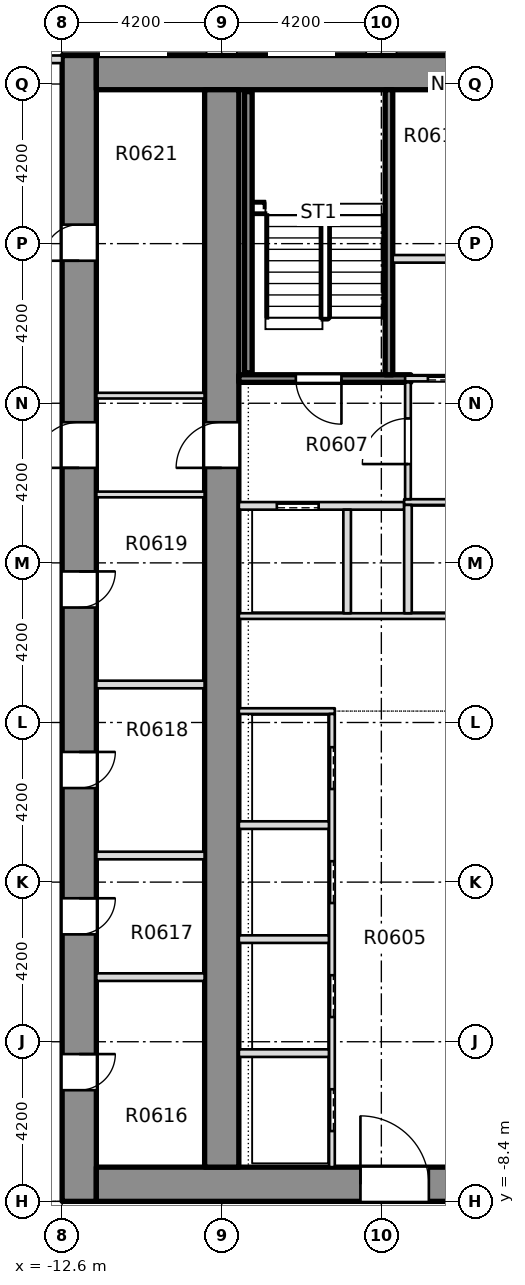
"""IFC4 building model, lengths in metres.
Left out: names, types, materials, properties, quantities, classifications, styles, units other than length and angle.
Written with IfcOpenShell. Run it as: python <this file> out.ifc"""

import sys

from ifc_helpers import new_model, si_unit, direction, frame, frame_2d, origin, place, context, subcontext, project, spatial, rectangle, extrude, element, fill, save


model = new_model("IFC4")
c1 = context("Model", 3, precision=1e-05, world=origin(), true_north=direction((0.0, 1.0)))
c2 = subcontext(c1, "Body", "Model", "MODEL_VIEW")
j1 = project(units=[si_unit("LENGTHUNIT", "METRE"), si_unit("PLANEANGLEUNIT", "RADIAN")], contexts=[c1])
p1 = place(None, origin())
s1 = spatial("IfcSite", under=j1, at=p1, CompositionType="ELEMENT")
p2 = place(p1, origin())
s2 = spatial("IfcBuilding", under=s1, at=p2, CompositionType="ELEMENT")
p3 = place(p2, frame((0.0, 0.0, 34.5)))
s3 = spatial("IfcBuildingStorey", under=s2, at=p3, CompositionType="ELEMENT", Elevation=34.5)
p4 = place(p3, frame((-12.15, -8.4, -0.32), z_axis=(0.0, 0.0, 1.0), x_axis=(0.0, 1.0, 0.0)))
e1 = element("IfcWall", 1, at=p4, inside=s3, PredefinedType="SHEAR", context=c2, shape_type="SweptSolid", body=[
    extrude(rectangle(XDim=30.15, YDim=0.9, at=frame_2d((15.075, 0.0))), origin(), (0.0, 0.0, 1.0), 3.45),
])
p5 = place(p4, frame((2.925, 0.0, 0.32)))
e2 = element("IfcOpeningElement", 2, at=p5, cuts=e1, PredefinedType="OPENING", context=c2, shape_type="SweptSolid", body=[
    extrude(rectangle(XDim=0.95, YDim=2.1, at=frame_2d((0.475, 1.05))), frame((0.0, 0.46, 0.0), z_axis=(0.0, -1.0, 0.0), x_axis=(1.0, 0.0, 0.0)), (0.0, 0.0, 1.0), 0.92),
])
p6 = place(p4, frame((7.025, 0.0, 0.32)))
e3 = element("IfcOpeningElement", 3, at=p6, cuts=e1, PredefinedType="OPENING", context=c2, shape_type="SweptSolid", body=[
    extrude(rectangle(XDim=0.95, YDim=2.1, at=frame_2d((0.475, 1.05))), frame((0.0, 0.46, 0.0), z_axis=(0.0, -1.0, 0.0), x_axis=(1.0, 0.0, 0.0)), (0.0, 0.0, 1.0), 0.92),
])
p7 = place(p4, frame((10.875, 0.0, 0.32)))
e4 = element("IfcOpeningElement", 4, at=p7, cuts=e1, PredefinedType="OPENING", context=c2, shape_type="SweptSolid", body=[
    extrude(rectangle(XDim=0.95, YDim=2.1, at=frame_2d((0.475, 1.05))), frame((0.0, 0.46, 0.0), z_axis=(0.0, -1.0, 0.0), x_axis=(1.0, 0.0, 0.0)), (0.0, 0.0, 1.0), 0.92),
])
p8 = place(p4, frame((15.625, 0.0, 0.32)))
e5 = element("IfcOpeningElement", 5, at=p8, cuts=e1, PredefinedType="OPENING", context=c2, shape_type="SweptSolid", body=[
    extrude(rectangle(XDim=0.95, YDim=2.1, at=frame_2d((0.475, 1.05))), frame((0.0, 0.46, 0.0), z_axis=(0.0, -1.0, 0.0), x_axis=(1.0, 0.0, 0.0)), (0.0, 0.0, 1.0), 0.92),
])
p9 = place(p4, frame((24.75, 0.0, 0.32)))
e6 = element("IfcOpeningElement", 6, at=p9, cuts=e1, PredefinedType="OPENING", context=c2, shape_type="SweptSolid", body=[
    extrude(rectangle(XDim=0.95, YDim=2.1, at=frame_2d((0.475, 1.05))), frame((0.0, 0.46, 0.0), z_axis=(0.0, -1.0, 0.0), x_axis=(1.0, 0.0, 0.0)), (0.0, 0.0, 1.0), 0.92),
])
p10 = place(p4, frame((19.3, 0.0, 0.32)))
e7 = element("IfcOpeningElement", 7, at=p10, cuts=e1, PredefinedType="OPENING", context=c2, shape_type="SweptSolid", body=[
    extrude(rectangle(XDim=1.2, YDim=2.1, at=frame_2d((0.6, 1.05))), frame((0.0, 0.46, 0.0), z_axis=(0.0, -1.0, 0.0), x_axis=(1.0, 0.0, 0.0)), (0.0, 0.0, 1.0), 0.92),
])
p11 = place(p3, frame((-11.7, -7.95, -0.32), z_axis=(0.0, 0.0, 1.0), x_axis=(1.0, 0.0, 0.0)))
e8 = element("IfcWall", 8, at=p11, inside=s3, PredefinedType="SHEAR", context=c2, shape_type="SweptSolid", body=[
    extrude(rectangle(XDim=23.4, YDim=0.9, at=frame_2d((11.7, 0.0))), origin(), (0.0, 0.0, 1.0), 3.45),
])
p12 = place(p11, frame((6.95, 0.0, 0.32)))
e9 = element("IfcOpeningElement", 9, at=p12, cuts=e8, PredefinedType="OPENING", context=c2, shape_type="SweptSolid", body=[
    extrude(rectangle(XDim=1.8, YDim=2.1, at=frame_2d((0.9, 1.05))), frame((0.0, 0.46, 0.0), z_axis=(0.0, -1.0, 0.0), x_axis=(1.0, 0.0, 0.0)), (0.0, 0.0, 1.0), 0.92),
])
p13 = place(p11, frame((14.65, 0.0, 0.32)))
e10 = element("IfcOpeningElement", 10, at=p13, cuts=e8, PredefinedType="OPENING", context=c2, shape_type="SweptSolid", body=[
    extrude(rectangle(XDim=1.8, YDim=2.1, at=frame_2d((0.9, 1.05))), frame((0.0, 0.46, 0.0), z_axis=(0.0, -1.0, 0.0), x_axis=(1.0, 0.0, 0.0)), (0.0, 0.0, 1.0), 0.92),
])
p14 = place(p3, frame((-11.7, 21.3, -0.32), z_axis=(0.0, 0.0, 1.0), x_axis=(1.0, 0.0, 0.0)))
e11 = element("IfcWall", 11, at=p14, inside=s3, PredefinedType="SOLIDWALL", context=c2, shape_type="SweptSolid", body=[
    extrude(rectangle(XDim=23.4, YDim=0.9, at=frame_2d((11.7, 0.0))), origin(), (0.0, 0.0, 1.0), 3.45),
])
p15 = place(p3, frame((-8.4, -7.5, -0.32), z_axis=(0.0, 0.0, 1.0), x_axis=(0.0, 1.0, 0.0)))
e12 = element("IfcWall", 12, at=p15, inside=s3, PredefinedType="SHEAR", context=c2, shape_type="SweptSolid", body=[
    extrude(rectangle(XDim=28.35, YDim=0.9, at=frame_2d((14.175, 0.0))), origin(), (0.0, 0.0, 1.0), 3.45),
])
p16 = place(p15, frame((18.4, 0.0, 0.32)))
e13 = element("IfcOpeningElement", 13, at=p16, cuts=e12, PredefinedType="OPENING", context=c2, shape_type="SweptSolid", body=[
    extrude(rectangle(XDim=1.2, YDim=2.1, at=frame_2d((0.6, 1.05))), frame((0.0, 0.46, 0.0), z_axis=(0.0, -1.0, 0.0), x_axis=(1.0, 0.0, 0.0)), (0.0, 0.0, 1.0), 0.92),
])
p17 = place(p3, frame((-12.6, 21.65, 0.0), z_axis=(0.0, 0.0, 1.0), x_axis=(-1.0, 0.0, 0.0)))
e14 = element("IfcWall", 14, at=p17, inside=s3, PredefinedType="STANDARD", context=c2, shape_type="SweptSolid", body=[
    extrude(rectangle(XDim=3.5, YDim=0.2, at=frame_2d((1.75, 0.0))), origin(), (0.0, 0.0, 1.0), 3.13),
])
p18 = place(p17, frame((0.3, 0.0, 0.2)))
e15 = element("IfcOpeningElement", 15, at=p18, cuts=e14, PredefinedType="OPENING", context=c2, shape_type="SweptSolid", body=[
    extrude(rectangle(XDim=1.8, YDim=2.65, at=frame_2d((0.9, 1.325))), frame((0.0, 0.11, 0.0), z_axis=(0.0, -1.0, 0.0), x_axis=(1.0, 0.0, 0.0)), (0.0, 0.0, 1.0), 0.22),
])
p19 = place(p17, frame((2.3, 0.0, 0.0)))
e16 = element("IfcOpeningElement", 16, at=p19, cuts=e14, PredefinedType="OPENING", context=c2, shape_type="SweptSolid", body=[
    extrude(rectangle(XDim=1.0, YDim=2.4, at=frame_2d((0.5, 1.2))), frame((0.0, 0.11, 0.0), z_axis=(0.0, -1.0, 0.0), x_axis=(1.0, 0.0, 0.0)), (0.0, 0.0, 1.0), 0.22),
])
for number, where, z_axis, x_axis in (
    (17, (-7.949, -4.5, 0.0), (0.0, 0.0, 1.0), (1.0, 0.0, 0.0)),
    (18, (-7.949, -1.5, 0.0), (0.0, 0.0, 1.0), (1.0, 0.0, 0.0)),
    (19, (-7.949, 1.5, 0.0), (0.0, 0.0, 1.0), (1.0, 0.0, 0.0)),
):
    element("IfcWall", number, at=place(p3, frame(where, z_axis=z_axis, x_axis=x_axis)), inside=s3, PredefinedType="PARTITIONING", context=c2, shape_type="SweptSolid", body=[
        extrude(rectangle(XDim=2.374, YDim=0.2, at=frame_2d((1.187, 0.0))), origin(), (0.0, 0.0, 1.0), 3.13),
    ])
p20 = place(p3, frame((-7.949, 4.5, 0.0), z_axis=(0.0, 0.0, 1.0), x_axis=(1.0, 0.0, 0.0)))
e20 = element("IfcWall", 20, at=p20, inside=s3, PredefinedType="PARTITIONING", context=c2, shape_type="SweptSolid", body=[
    extrude(rectangle(XDim=2.524, YDim=0.15, at=frame_2d((1.262, 0.0))), origin(), (0.0, 0.0, 1.0), 3.13),
])
p21 = place(p3, frame((-7.949, 7.0, 0.0), z_axis=(0.0, 0.0, 1.0), x_axis=(1.0, 0.0, 0.0)))
e21 = element("IfcWall", 21, at=p21, inside=s3, PredefinedType="PARTITIONING", context=c2, shape_type="SweptSolid", body=[
    extrude(rectangle(XDim=15.898, YDim=0.15, at=frame_2d((7.949, 0.0))), origin(), (0.0, 0.0, 1.0), 3.13),
])
p22 = place(p21, frame((7.249, 0.0, 0.0)))
e22 = element("IfcOpeningElement", 22, at=p22, cuts=e21, PredefinedType="OPENING", context=c2, shape_type="SweptSolid", body=[
    extrude(rectangle(XDim=1.4, YDim=2.1, at=frame_2d((0.7, 1.05))), frame((0.0, 0.085, 0.0), z_axis=(0.0, -1.0, 0.0), x_axis=(1.0, 0.0, 0.0)), (0.0, 0.0, 1.0), 0.17),
])
p23 = place(p3, frame((-7.949, 9.9, 0.0), z_axis=(0.0, 0.0, 1.0), x_axis=(1.0, 0.0, 0.0)))
e23 = element("IfcWall", 23, at=p23, inside=s3, PredefinedType="PARTITIONING", context=c2, shape_type="SweptSolid", body=[
    extrude(rectangle(XDim=4.349, YDim=0.2, at=frame_2d((2.174, 0.0))), origin(), (0.0, 0.0, 1.0), 3.13),
])
p24 = place(p23, frame((0.999, 0.0, 0.0)))
e24 = element("IfcOpeningElement", 24, at=p24, cuts=e23, PredefinedType="OPENING", context=c2, shape_type="SweptSolid", body=[
    extrude(rectangle(XDim=1.1, YDim=2.1, at=frame_2d((0.55, 1.05))), frame((0.0, 0.11, 0.0), z_axis=(0.0, -1.0, 0.0), x_axis=(1.0, 0.0, 0.0)), (0.0, 0.0, 1.0), 0.22),
])
p25 = place(p3, frame((-3.6, 10.0, 0.0), z_axis=(0.0, 0.0, 1.0), x_axis=(1.0, 0.0, 0.0)))
e25 = element("IfcWall", 25, at=p25, inside=s3, PredefinedType="PARTITIONING", context=c2, shape_type="SweptSolid", body=[
    extrude(rectangle(XDim=7.2, YDim=0.15, at=frame_2d((3.6, 0.0))), origin(), (0.0, 0.0, 1.0), 3.13),
])
p26 = place(p25, frame((2.9, 0.0, 0.0)))
e26 = element("IfcOpeningElement", 26, at=p26, cuts=e25, PredefinedType="OPENING", context=c2, shape_type="SweptSolid", body=[
    extrude(rectangle(XDim=1.4, YDim=2.1, at=frame_2d((0.7, 1.05))), frame((0.0, 0.085, 0.0), z_axis=(0.0, -1.0, 0.0), x_axis=(1.0, 0.0, 0.0)), (0.0, 0.0, 1.0), 0.17),
])
p27 = place(p3, frame((-7.949, 13.25, 0.0), z_axis=(0.0, 0.0, 1.0), x_axis=(1.0, 0.0, 0.0)))
e27 = element("IfcWall", 27, at=p27, inside=s3, PredefinedType="SOLIDWALL", context=c2, shape_type="SweptSolid", body=[
    extrude(rectangle(XDim=4.524, YDim=0.2, at=frame_2d((2.262, 0.0))), origin(), (0.0, 0.0, 1.0), 3.13),
])
p28 = place(p27, frame((1.499, 0.0, 0.0)))
e28 = element("IfcOpeningElement", 28, at=p28, cuts=e27, PredefinedType="OPENING", context=c2, shape_type="SweptSolid", body=[
    extrude(rectangle(XDim=1.2, YDim=2.1, at=frame_2d((0.6, 1.05))), frame((0.0, 0.11, 0.0), z_axis=(0.0, -1.0, 0.0), x_axis=(1.0, 0.0, 0.0)), (0.0, 0.0, 1.0), 0.22),
])
p29 = place(p3, frame((-3.575, 13.25, 0.0), z_axis=(0.0, 0.0, 1.0), x_axis=(1.0, 0.0, 0.0)))
e29 = element("IfcWall", 29, at=p29, inside=s3, PredefinedType="PARTITIONING", context=c2, shape_type="SweptSolid", body=[
    extrude(rectangle(XDim=7.15, YDim=0.15, at=frame_2d((3.575, 0.0))), origin(), (0.0, 0.0, 1.0), 3.13),
])
p30 = place(p29, frame((0.6, 0.0, 0.0)))
e30 = element("IfcOpeningElement", 30, at=p30, cuts=e29, PredefinedType="OPENING", context=c2, shape_type="SweptSolid", body=[
    extrude(rectangle(XDim=1.2, YDim=2.1, at=frame_2d((0.6, 1.05))), frame((0.0, 0.085, 0.0), z_axis=(0.0, -1.0, 0.0), x_axis=(1.0, 0.0, 0.0)), (0.0, 0.0, 1.0), 0.17),
])
p31 = place(p29, frame((5.4, 0.0, 0.0)))
e31 = element("IfcOpeningElement", 31, at=p31, cuts=e29, PredefinedType="OPENING", context=c2, shape_type="SweptSolid", body=[
    extrude(rectangle(XDim=1.1, YDim=2.1, at=frame_2d((0.55, 1.05))), frame((0.0, 0.085, 0.0), z_axis=(0.0, -1.0, 0.0), x_axis=(1.0, 0.0, 0.0)), (0.0, 0.0, 1.0), 0.17),
])
p32 = place(p29, frame((2.975, 0.0, 0.0)))
e32 = element("IfcOpeningElement", 32, at=p32, cuts=e29, PredefinedType="OPENING", context=c2, shape_type="SweptSolid", body=[
    extrude(rectangle(XDim=1.2, YDim=2.1, at=frame_2d((0.6, 1.05))), frame((0.0, 0.085, 0.0), z_axis=(0.0, -1.0, 0.0), x_axis=(1.0, 0.0, 0.0)), (0.0, 0.0, 1.0), 0.17),
])
p33 = place(p3, frame((-3.9, 16.4, 0.0), z_axis=(0.0, 0.0, 1.0), x_axis=(1.0, 0.0, 0.0)))
e33 = element("IfcWall", 33, at=p33, inside=s3, PredefinedType="PARTITIONING", context=c2, shape_type="SweptSolid", body=[
    extrude(rectangle(XDim=3.05, YDim=0.2, at=frame_2d((1.525, 0.0))), origin(), (0.0, 0.0, 1.0), 3.13),
])
p34 = place(p3, frame((-5.5, -7.499, 0.0), z_axis=(0.0, 0.0, 1.0), x_axis=(0.0, 1.0, 0.0)))
e34 = element("IfcWall", 34, at=p34, inside=s3, PredefinedType="PARTITIONING", context=c2, shape_type="SweptSolid", body=[
    extrude(rectangle(XDim=11.924, YDim=0.15, at=frame_2d((5.962, 0.0))), origin(), (0.0, 0.0, 1.0), 3.13),
])
p35 = place(p34, frame((0.949, 0.0, 0.0)))
e35 = element("IfcOpeningElement", 35, at=p35, cuts=e34, PredefinedType="OPENING", context=c2, shape_type="SweptSolid", body=[
    extrude(rectangle(XDim=1.1, YDim=2.1, at=frame_2d((0.55, 1.05))), frame((0.0, 0.085, 0.0), z_axis=(0.0, -1.0, 0.0), x_axis=(1.0, 0.0, 0.0)), (0.0, 0.0, 1.0), 0.17),
])
p36 = place(p34, frame((3.949, 0.0, 0.0)))
e36 = element("IfcOpeningElement", 36, at=p36, cuts=e34, PredefinedType="OPENING", context=c2, shape_type="SweptSolid", body=[
    extrude(rectangle(XDim=1.1, YDim=2.1, at=frame_2d((0.55, 1.05))), frame((0.0, 0.085, 0.0), z_axis=(0.0, -1.0, 0.0), x_axis=(1.0, 0.0, 0.0)), (0.0, 0.0, 1.0), 0.17),
])
p37 = place(p34, frame((6.949, 0.0, 0.0)))
e37 = element("IfcOpeningElement", 37, at=p37, cuts=e34, PredefinedType="OPENING", context=c2, shape_type="SweptSolid", body=[
    extrude(rectangle(XDim=1.1, YDim=2.1, at=frame_2d((0.55, 1.05))), frame((0.0, 0.085, 0.0), z_axis=(0.0, -1.0, 0.0), x_axis=(1.0, 0.0, 0.0)), (0.0, 0.0, 1.0), 0.17),
])
p38 = place(p34, frame((9.949, 0.0, 0.0)))
e38 = element("IfcOpeningElement", 38, at=p38, cuts=e34, PredefinedType="OPENING", context=c2, shape_type="SweptSolid", body=[
    extrude(rectangle(XDim=1.1, YDim=2.1, at=frame_2d((0.55, 1.05))), frame((0.0, 0.085, 0.0), z_axis=(0.0, -1.0, 0.0), x_axis=(1.0, 0.0, 0.0)), (0.0, 0.0, 1.0), 0.17),
])
p39 = place(p3, frame((-5.1, 7.075, 0.0), z_axis=(0.0, 0.0, 1.0), x_axis=(0.0, 1.0, 0.0)))
e39 = element("IfcWall", 39, at=p39, inside=s3, PredefinedType="PARTITIONING", context=c2, shape_type="SweptSolid", body=[
    extrude(rectangle(XDim=2.725, YDim=0.2, at=frame_2d((1.363, 0.0))), origin(), (0.0, 0.0, 1.0), 3.13),
])
p40 = place(p3, frame((-4.0, 13.35, 0.0), z_axis=(0.0, 0.0, 1.0), x_axis=(0.0, 1.0, 0.0)))
e40 = element("IfcWall", 40, at=p40, inside=s3, PredefinedType="SOLIDWALL", context=c2, shape_type="SweptSolid", body=[
    extrude(rectangle(XDim=7.499, YDim=0.2, at=frame_2d((3.75, 0.0))), origin(), (0.0, 0.0, 1.0), 3.13),
])
p41 = place(p3, frame((-3.5, 7.075, 0.0), z_axis=(0.0, 0.0, 1.0), x_axis=(0.0, 1.0, 0.0)))
e41 = element("IfcWall", 41, at=p41, inside=s3, PredefinedType="PARTITIONING", context=c2, shape_type="SweptSolid", body=[
    extrude(rectangle(XDim=2.85, YDim=0.2, at=frame_2d((1.425, 0.0))), origin(), (0.0, 0.0, 1.0), 3.13),
])
p42 = place(p3, frame((-3.5, 10.075, 0.0), z_axis=(0.0, 0.0, 1.0), x_axis=(0.0, 1.0, 0.0)))
e42 = element("IfcWall", 42, at=p42, inside=s3, PredefinedType="PARTITIONING", context=c2, shape_type="SweptSolid", body=[
    extrude(rectangle(XDim=3.075, YDim=0.15, at=frame_2d((1.538, 0.0))), origin(), (0.0, 0.0, 1.0), 3.13),
])
p43 = place(p42, frame((0.925, 0.0, 0.0)))
e43 = element("IfcOpeningElement", 43, at=p43, cuts=e42, PredefinedType="OPENING", context=c2, shape_type="SweptSolid", body=[
    extrude(rectangle(XDim=1.2, YDim=2.1, at=frame_2d((0.6, 1.05))), frame((0.0, 0.085, 0.0), z_axis=(0.0, -1.0, 0.0), x_axis=(1.0, 0.0, 0.0)), (0.0, 0.0, 1.0), 0.17),
])
for number, where, z_axis, x_axis in (
    (44, (-11.699, -2.5, 0.0), (0.0, 0.0, 1.0), (1.0, 0.0, 0.0)),
    (45, (-11.699, 0.7, 0.0), (0.0, 0.0, 1.0), (1.0, 0.0, 0.0)),
    (46, (-11.699, 5.2, 0.0), (0.0, 0.0, 1.0), (1.0, 0.0, 0.0)),
):
    element("IfcWall", number, at=place(p3, frame(where, z_axis=z_axis, x_axis=x_axis)), inside=s3, PredefinedType="PARTITIONING", context=c2, shape_type="SweptSolid", body=[
        extrude(rectangle(XDim=2.848, YDim=0.2, at=frame_2d((1.424, 0.0))), origin(), (0.0, 0.0, 1.0), 3.13),
    ])
for number, where, z_axis, x_axis in (
    (47, (-11.699, 10.2, 0.0), (0.0, 0.0, 1.0), (1.0, 0.0, 0.0)),
    (48, (-11.699, 12.8, 0.0), (0.0, 0.0, 1.0), (1.0, 0.0, 0.0)),
):
    element("IfcWall", number, at=place(p3, frame(where, z_axis=z_axis, x_axis=x_axis)), inside=s3, PredefinedType="PARTITIONING", context=c2, shape_type="SweptSolid", body=[
        extrude(rectangle(XDim=2.848, YDim=0.15, at=frame_2d((1.424, 0.0))), origin(), (0.0, 0.0, 1.0), 3.13),
    ])
p44 = place(p3, frame((-7.7, 13.4, 0.0), z_axis=(0.0, 0.0, 1.0), x_axis=(0.0, 1.0, 0.0)))
e49 = element("IfcWall", 49, at=p44, inside=s3, PredefinedType="SOLIDWALL", context=c2, shape_type="SweptSolid", body=[
    extrude(rectangle(XDim=7.4, YDim=0.2, at=frame_2d((3.7, 0.0))), origin(), (0.0, 0.0, 1.0), 3.13),
])
p45 = place(p35, origin())
e50 = element("IfcDoor", 50, at=p45, inside=s3, OperationType="SLIDING_TO_RIGHT", PredefinedType="DOOR", context=c2, shape_type="SweptSolid", body=[
    extrude(rectangle(XDim=1.1, YDim=2.1, at=frame_2d((0.55, 1.05))), frame((0.0, 0.025, 0.0), z_axis=(0.0, -1.0, 0.0), x_axis=(1.0, 0.0, 0.0)), (0.0, 0.0, 1.0), 0.05),
])
fill(e35, e50)
p46 = place(p36, origin())
e51 = element("IfcDoor", 51, at=p46, inside=s3, OperationType="SLIDING_TO_RIGHT", PredefinedType="DOOR", context=c2, shape_type="SweptSolid", body=[
    extrude(rectangle(XDim=1.1, YDim=2.1, at=frame_2d((0.55, 1.05))), frame((0.0, 0.025, 0.0), z_axis=(0.0, -1.0, 0.0), x_axis=(1.0, 0.0, 0.0)), (0.0, 0.0, 1.0), 0.05),
])
fill(e36, e51)
p47 = place(p37, origin())
e52 = element("IfcDoor", 52, at=p47, inside=s3, OperationType="SLIDING_TO_RIGHT", PredefinedType="DOOR", context=c2, shape_type="SweptSolid", body=[
    extrude(rectangle(XDim=1.1, YDim=2.1, at=frame_2d((0.55, 1.05))), frame((0.0, 0.025, 0.0), z_axis=(0.0, -1.0, 0.0), x_axis=(1.0, 0.0, 0.0)), (0.0, 0.0, 1.0), 0.05),
])
fill(e37, e52)
p48 = place(p38, origin())
e53 = element("IfcDoor", 53, at=p48, inside=s3, OperationType="SLIDING_TO_RIGHT", PredefinedType="DOOR", context=c2, shape_type="SweptSolid", body=[
    extrude(rectangle(XDim=1.1, YDim=2.1, at=frame_2d((0.55, 1.05))), frame((0.0, 0.025, 0.0), z_axis=(0.0, -1.0, 0.0), x_axis=(1.0, 0.0, 0.0)), (0.0, 0.0, 1.0), 0.05),
])
fill(e38, e53)
p49 = place(p28, origin())
e54 = element("IfcDoor", 54, at=p49, inside=s3, OperationType="SINGLE_SWING_LEFT", PredefinedType="DOOR", context=c2, shape_type="SweptSolid", body=[
    extrude(rectangle(XDim=1.2, YDim=2.1, at=frame_2d((0.6, 1.05))), frame((0.0, 0.025, 0.0), z_axis=(0.0, -1.0, 0.0), x_axis=(1.0, 0.0, 0.0)), (0.0, 0.0, 1.0), 0.05),
])
fill(e28, e54)
p50 = place(p24, origin())
e55 = element("IfcDoor", 55, at=p50, inside=s3, OperationType="SLIDING_TO_RIGHT", PredefinedType="DOOR", context=c2, shape_type="SweptSolid", body=[
    extrude(rectangle(XDim=1.1, YDim=2.1, at=frame_2d((0.55, 1.05))), frame((0.0, 0.025, 0.0), z_axis=(0.0, -1.0, 0.0), x_axis=(1.0, 0.0, 0.0)), (0.0, 0.0, 1.0), 0.05),
])
fill(e24, e55)
p51 = place(p30, origin())
e56 = element("IfcDoor", 56, at=p51, inside=s3, OperationType="SLIDING_TO_RIGHT", PredefinedType="DOOR", context=c2, shape_type="SweptSolid", body=[
    extrude(rectangle(XDim=1.2, YDim=2.1, at=frame_2d((0.6, 1.05))), frame((0.0, 0.025, 0.0), z_axis=(0.0, -1.0, 0.0), x_axis=(1.0, 0.0, 0.0)), (0.0, 0.0, 1.0), 0.05),
])
fill(e30, e56)
p52 = place(p43, origin())
e57 = element("IfcDoor", 57, at=p52, inside=s3, OperationType="SINGLE_SWING_RIGHT", PredefinedType="DOOR", context=c2, shape_type="SweptSolid", body=[
    extrude(rectangle(XDim=1.2, YDim=2.1, at=frame_2d((0.6, 1.05))), frame((0.0, 0.025, 0.0), z_axis=(0.0, -1.0, 0.0), x_axis=(1.0, 0.0, 0.0)), (0.0, 0.0, 1.0), 0.05),
])
fill(e43, e57)
p53 = place(p12, origin())
e58 = element("IfcDoor", 58, at=p53, inside=s3, OperationType="SINGLE_SWING_LEFT", PredefinedType="DOOR", context=c2, shape_type="SweptSolid", body=[
    extrude(rectangle(XDim=1.8, YDim=2.1, at=frame_2d((0.9, 1.05))), frame((0.0, 0.025, 0.0), z_axis=(0.0, -1.0, 0.0), x_axis=(1.0, 0.0, 0.0)), (0.0, 0.0, 1.0), 0.05),
])
fill(e9, e58)
p54 = place(p5, origin())
e59 = element("IfcDoor", 59, at=p54, inside=s3, OperationType="SINGLE_SWING_LEFT", PredefinedType="DOOR", context=c2, shape_type="SweptSolid", body=[
    extrude(rectangle(XDim=0.95, YDim=2.1, at=frame_2d((0.475, 1.05))), frame((0.0, 0.025, 0.0), z_axis=(0.0, -1.0, 0.0), x_axis=(1.0, 0.0, 0.0)), (0.0, 0.0, 1.0), 0.05),
])
fill(e2, e59)
p55 = place(p6, origin())
e60 = element("IfcDoor", 60, at=p55, inside=s3, OperationType="SINGLE_SWING_LEFT", PredefinedType="DOOR", context=c2, shape_type="SweptSolid", body=[
    extrude(rectangle(XDim=0.95, YDim=2.1, at=frame_2d((0.475, 1.05))), frame((0.0, 0.025, 0.0), z_axis=(0.0, -1.0, 0.0), x_axis=(1.0, 0.0, 0.0)), (0.0, 0.0, 1.0), 0.05),
])
fill(e3, e60)
p56 = place(p7, origin())
e61 = element("IfcDoor", 61, at=p56, inside=s3, OperationType="SINGLE_SWING_LEFT", PredefinedType="DOOR", context=c2, shape_type="SweptSolid", body=[
    extrude(rectangle(XDim=0.95, YDim=2.1, at=frame_2d((0.475, 1.05))), frame((0.0, 0.025, 0.0), z_axis=(0.0, -1.0, 0.0), x_axis=(1.0, 0.0, 0.0)), (0.0, 0.0, 1.0), 0.05),
])
fill(e4, e61)
p57 = place(p8, origin())
e62 = element("IfcDoor", 62, at=p57, inside=s3, OperationType="SINGLE_SWING_LEFT", PredefinedType="DOOR", context=c2, shape_type="SweptSolid", body=[
    extrude(rectangle(XDim=0.95, YDim=2.1, at=frame_2d((0.475, 1.05))), frame((0.0, 0.025, 0.0), z_axis=(0.0, -1.0, 0.0), x_axis=(1.0, 0.0, 0.0)), (0.0, 0.0, 1.0), 0.05),
])
fill(e5, e62)
p58 = place(p9, origin())
e63 = element("IfcDoor", 63, at=p58, inside=s3, OperationType="SINGLE_SWING_LEFT", PredefinedType="DOOR", context=c2, shape_type="SweptSolid", body=[
    extrude(rectangle(XDim=0.95, YDim=2.1, at=frame_2d((0.475, 1.05))), frame((0.0, 0.025, 0.0), z_axis=(0.0, -1.0, 0.0), x_axis=(1.0, 0.0, 0.0)), (0.0, 0.0, 1.0), 0.05),
])
fill(e6, e63)
p59 = place(p10, origin())
e64 = element("IfcDoor", 64, at=p59, inside=s3, OperationType="SINGLE_SWING_LEFT", PredefinedType="DOOR", context=c2, shape_type="SweptSolid", body=[
    extrude(rectangle(XDim=1.2, YDim=2.1, at=frame_2d((0.6, 1.05))), frame((0.0, 0.025, 0.0), z_axis=(0.0, -1.0, 0.0), x_axis=(1.0, 0.0, 0.0)), (0.0, 0.0, 1.0), 0.05),
])
fill(e7, e64)
p60 = place(p16, origin())
e65 = element("IfcDoor", 65, at=p60, inside=s3, OperationType="SINGLE_SWING_LEFT", PredefinedType="DOOR", context=c2, shape_type="SweptSolid", body=[
    extrude(rectangle(XDim=1.2, YDim=2.1, at=frame_2d((0.6, 1.05))), frame((0.0, 0.025, 0.0), z_axis=(0.0, -1.0, 0.0), x_axis=(1.0, 0.0, 0.0)), (0.0, 0.0, 1.0), 0.05),
])
fill(e13, e65)
save(model, sys.argv[1])
